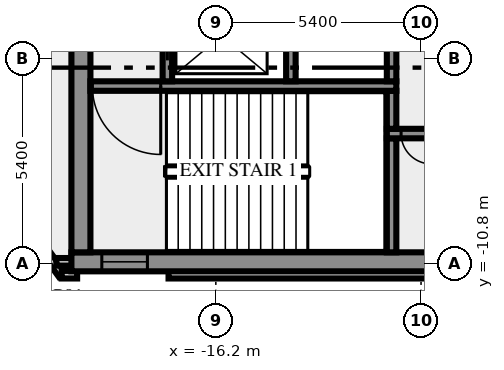
"""IFC4 building model, lengths in metres.
Left out: names, types, materials, properties, quantities, classifications, styles, units other than length and angle.
Written with IfcOpenShell. Run it as: python <this file> out.ifc"""

import sys

from ifc_helpers import new_model, si_unit, direction, frame, frame_2d, origin, place, context, subcontext, project, spatial, rectangle, extrude, element, fill, save


model = new_model("IFC4")
c1 = context("Model", 3, precision=1e-05, world=origin(), true_north=direction((0.0, 1.0)))
c2 = subcontext(c1, "Body", "Model", "MODEL_VIEW")
j1 = project(units=[si_unit("LENGTHUNIT", "METRE"), si_unit("PLANEANGLEUNIT", "RADIAN")], contexts=[c1])
p1 = place(None, origin())
s1 = spatial("IfcSite", under=j1, at=p1, CompositionType="ELEMENT")
p2 = place(p1, origin())
s2 = spatial("IfcBuilding", under=s1, at=p2, CompositionType="ELEMENT")
p3 = place(p2, frame((0.0, 0.0, 261.0)))
s3 = spatial("IfcBuildingStorey", under=s2, at=p3, CompositionType="ELEMENT", Elevation=261.0)
p4 = place(p3, frame((-21.833, -8.909, 0.0), z_axis=(0.0, 0.0, 1.0), x_axis=(0.587766567315, -0.809030569476, 0.0)))
e1 = element("IfcWall", 1, at=p4, inside=s3, PredefinedType="SOLIDWALL", context=c2, shape_type="SweptSolid", body=[
    extrude(rectangle(XDim=2.688, YDim=0.2, at=frame_2d((1.344, 0.0))), origin(), (0.0, 0.0, 1.0), 3.65),
])
p5 = place(p3, frame((-20.256, -11.088, 0.0), z_axis=(0.0, 0.0, 1.0), x_axis=(1.0, 0.0, 0.0)))
e2 = element("IfcWall", 2, at=p5, inside=s3, PredefinedType="SOLIDWALL", context=c2, shape_type="SweptSolid", body=[
    extrude(rectangle(XDim=0.406, YDim=0.2, at=frame_2d((0.203, 0.0))), origin(), (0.0, 0.0, 1.0), 3.65),
])
p6 = place(p3, frame((-17.444, -11.088, 0.0), z_axis=(0.0, 0.0, 1.0), x_axis=(1.0, 0.0, 0.0)))
e3 = element("IfcWall", 3, at=p6, inside=s3, PredefinedType="SOLIDWALL", context=c2, shape_type="SweptSolid", body=[
    extrude(rectangle(XDim=34.888, YDim=0.2, at=frame_2d((17.444, 0.0))), origin(), (0.0, 0.0, 1.0), 3.65),
])
p7 = place(p3, frame((-19.98, -10.75, 0.0), z_axis=(0.0, 0.0, 1.0), x_axis=(-1.0, 0.0, 0.0)))
e4 = element("IfcWall", 4, at=p7, inside=s3, PredefinedType="SOLIDWALL", context=c2, shape_type="SweptSolid", body=[
    extrude(rectangle(XDim=0.417, YDim=0.2, at=frame_2d((0.208, 0.0))), origin(), (0.0, 0.0, 1.0), 3.65),
])
p8 = place(p3, frame((-20.0, -10.75, 0.0), z_axis=(0.0, 0.0, 1.0), x_axis=(1.0, 0.0, 0.0)))
e5 = element("IfcWall", 5, at=p8, inside=s3, PredefinedType="SHEAR", context=c2, shape_type="SweptSolid", body=[
    extrude(rectangle(XDim=40.0, YDim=0.5, at=frame_2d((20.0, 0.0))), origin(), (0.0, 0.0, 1.0), 3.65),
])
p9 = place(p8, frame((0.8, 0.0, 1.0)))
e6 = element("IfcOpeningElement", 6, at=p9, cuts=e5, PredefinedType="OPENING", context=c2, shape_type="SweptSolid", body=[
    extrude(rectangle(XDim=1.2, YDim=1.2, at=frame_2d((0.6, 0.6))), frame((0.0, 0.26, 0.0), z_axis=(0.0, -1.0, 0.0), x_axis=(1.0, 0.0, 0.0)), (0.0, 0.0, 1.0), 0.52),
])
p10 = place(p8, frame((38.0, 0.0, 1.0)))
e7 = element("IfcOpeningElement", 7, at=p10, cuts=e5, PredefinedType="OPENING", context=c2, shape_type="SweptSolid", body=[
    extrude(rectangle(XDim=1.2, YDim=1.2, at=frame_2d((0.6, 0.6))), frame((0.0, 0.26, 0.0), z_axis=(0.0, -1.0, 0.0), x_axis=(1.0, 0.0, 0.0)), (0.0, 0.0, 1.0), 0.52),
])
p11 = place(p3, frame((-19.75, -10.5, 0.0), z_axis=(0.0, 0.0, 1.0), x_axis=(0.0, 1.0, 0.0)))
e8 = element("IfcWall", 8, at=p11, inside=s3, PredefinedType="SHEAR", context=c2, shape_type="SweptSolid", body=[
    extrude(rectangle(XDim=8.8, YDim=0.5, at=frame_2d((4.4, 0.0))), origin(), (0.0, 0.0, 1.0), 3.65),
])
p12 = place(p3, frame((-11.575, -10.5, 0.0), z_axis=(0.0, 0.0, 1.0), x_axis=(0.0, 1.0, 0.0)))
e9 = element("IfcWall", 9, at=p12, inside=s3, PredefinedType="SHEAR", context=c2, shape_type="SweptSolid", body=[
    extrude(rectangle(XDim=3.0, YDim=0.25, at=frame_2d((1.5, 0.0))), origin(), (0.0, 0.0, 1.0), 3.65),
])
p13 = place(p3, frame((11.7, -7.375, 0.0), z_axis=(0.0, 0.0, 1.0), x_axis=(-1.0, 0.0, 0.0)))
e10 = element("IfcWall", 10, at=p13, inside=s3, PredefinedType="SHEAR", context=c2, shape_type="SweptSolid", body=[
    extrude(rectangle(XDim=23.4, YDim=0.25, at=frame_2d((11.7, 0.0))), origin(), (0.0, 0.0, 1.0), 3.65),
])
p14 = place(p13, frame((22.225, 0.0, 0.0)))
e11 = element("IfcOpeningElement", 11, at=p14, cuts=e10, PredefinedType="OPENING", context=c2, shape_type="SweptSolid", body=[
    extrude(rectangle(XDim=0.8, YDim=2.1, at=frame_2d((0.4, 1.05))), frame((0.0, 0.135, 0.0), z_axis=(0.0, -1.0, 0.0), x_axis=(1.0, 0.0, 0.0)), (0.0, 0.0, 1.0), 0.27),
])
p15 = place(p13, frame((20.2, 0.0, 0.0)))
e12 = element("IfcOpeningElement", 12, at=p15, cuts=e10, PredefinedType="OPENING", context=c2, shape_type="SweptSolid", body=[
    extrude(rectangle(XDim=1.1, YDim=2.1, at=frame_2d((0.55, 1.05))), frame((0.0, 0.135, 0.0), z_axis=(0.0, -1.0, 0.0), x_axis=(1.0, 0.0, 0.0)), (0.0, 0.0, 1.0), 0.27),
])
p16 = place(p13, frame((17.7, 0.0, 0.0)))
e13 = element("IfcOpeningElement", 13, at=p16, cuts=e10, PredefinedType="OPENING", context=c2, shape_type="SweptSolid", body=[
    extrude(rectangle(XDim=1.1, YDim=2.1, at=frame_2d((0.55, 1.05))), frame((0.0, 0.135, 0.0), z_axis=(0.0, -1.0, 0.0), x_axis=(1.0, 0.0, 0.0)), (0.0, 0.0, 1.0), 0.27),
])
p17 = place(p13, frame((15.975, 0.0, 0.0)))
e14 = element("IfcOpeningElement", 14, at=p17, cuts=e10, PredefinedType="OPENING", context=c2, shape_type="SweptSolid", body=[
    extrude(rectangle(XDim=0.8, YDim=2.1, at=frame_2d((0.4, 1.05))), frame((0.0, 0.135, 0.0), z_axis=(0.0, -1.0, 0.0), x_axis=(1.0, 0.0, 0.0)), (0.0, 0.0, 1.0), 0.27),
])
p18 = place(p13, frame((14.75, 0.0, 0.0)))
e15 = element("IfcOpeningElement", 15, at=p18, cuts=e10, PredefinedType="OPENING", context=c2, shape_type="SweptSolid", body=[
    extrude(rectangle(XDim=0.7, YDim=2.1, at=frame_2d((0.35, 1.05))), frame((0.0, 0.135, 0.0), z_axis=(0.0, -1.0, 0.0), x_axis=(1.0, 0.0, 0.0)), (0.0, 0.0, 1.0), 0.27),
])
p19 = place(p13, frame((13.35, 0.0, 0.0)))
e16 = element("IfcOpeningElement", 16, at=p19, cuts=e10, PredefinedType="OPENING", context=c2, shape_type="SweptSolid", body=[
    extrude(rectangle(XDim=0.9, YDim=2.1, at=frame_2d((0.45, 1.05))), frame((0.0, 0.135, 0.0), z_axis=(0.0, -1.0, 0.0), x_axis=(1.0, 0.0, 0.0)), (0.0, 0.0, 1.0), 0.27),
])
p20 = place(p13, frame((11.975, 0.0, 0.0)))
e17 = element("IfcOpeningElement", 17, at=p20, cuts=e10, PredefinedType="OPENING", context=c2, shape_type="SweptSolid", body=[
    extrude(rectangle(XDim=0.9, YDim=2.1, at=frame_2d((0.45, 1.05))), frame((0.0, 0.135, 0.0), z_axis=(0.0, -1.0, 0.0), x_axis=(1.0, 0.0, 0.0)), (0.0, 0.0, 1.0), 0.27),
])
p21 = place(p13, frame((10.5, 0.0, 0.0)))
e18 = element("IfcOpeningElement", 18, at=p21, cuts=e10, PredefinedType="OPENING", context=c2, shape_type="SweptSolid", body=[
    extrude(rectangle(XDim=0.9, YDim=2.1, at=frame_2d((0.45, 1.05))), frame((0.0, 0.135, 0.0), z_axis=(0.0, -1.0, 0.0), x_axis=(1.0, 0.0, 0.0)), (0.0, 0.0, 1.0), 0.27),
])
p22 = place(p13, frame((8.388, 0.0, 0.0)))
e19 = element("IfcOpeningElement", 19, at=p22, cuts=e10, PredefinedType="OPENING", context=c2, shape_type="SweptSolid", body=[
    extrude(rectangle(XDim=0.9, YDim=2.1, at=frame_2d((0.45, 1.05))), frame((0.0, 0.135, 0.0), z_axis=(0.0, -1.0, 0.0), x_axis=(1.0, 0.0, 0.0)), (0.0, 0.0, 1.0), 0.27),
])
p23 = place(p13, frame((5.375, 0.0, 0.0)))
e20 = element("IfcOpeningElement", 20, at=p23, cuts=e10, PredefinedType="OPENING", context=c2, shape_type="SweptSolid", body=[
    extrude(rectangle(XDim=0.9, YDim=2.1, at=frame_2d((0.45, 1.05))), frame((0.0, 0.135, 0.0), z_axis=(0.0, -1.0, 0.0), x_axis=(1.0, 0.0, 0.0)), (0.0, 0.0, 1.0), 0.27),
])
p24 = place(p13, frame((1.688, 0.0, 0.0)))
e21 = element("IfcOpeningElement", 21, at=p24, cuts=e10, PredefinedType="OPENING", context=c2, shape_type="SweptSolid", body=[
    extrude(rectangle(XDim=0.9, YDim=2.1, at=frame_2d((0.45, 1.05))), frame((0.0, 0.135, 0.0), z_axis=(0.0, -1.0, 0.0), x_axis=(1.0, 0.0, 0.0)), (0.0, 0.0, 1.0), 0.27),
])
p25 = place(p3, frame((-11.575, -7.25, 0.0), z_axis=(0.0, 0.0, 1.0), x_axis=(0.0, 1.0, 0.0)))
e22 = element("IfcWall", 22, at=p25, inside=s3, PredefinedType="SHEAR", context=c2, shape_type="SweptSolid", body=[
    extrude(rectangle(XDim=1.0, YDim=0.25, at=frame_2d((0.5, 0.0))), origin(), (0.0, 0.0, 1.0), 3.65),
])
p26 = place(p3, frame((-11.45, -6.125, 0.0), z_axis=(0.0, 0.0, 1.0), x_axis=(-1.0, 0.0, 0.0)))
e23 = element("IfcWall", 23, at=p26, inside=s3, PredefinedType="SHEAR", context=c2, shape_type="SweptSolid", body=[
    extrude(rectangle(XDim=8.05, YDim=0.25, at=frame_2d((4.025, 0.0))), origin(), (0.0, 0.0, 1.0), 3.65),
])
p27 = place(p26, frame((6.2, 0.0, 0.0)))
e24 = element("IfcOpeningElement", 24, at=p27, cuts=e23, PredefinedType="OPENING", context=c2, shape_type="SweptSolid", body=[
    extrude(rectangle(XDim=1.8, YDim=2.1, at=frame_2d((0.9, 1.05))), frame((0.0, 0.135, 0.0), z_axis=(0.0, -1.0, 0.0), x_axis=(1.0, 0.0, 0.0)), (0.0, 0.0, 1.0), 0.27),
])
p28 = place(p3, frame((-17.475, -6.0, 0.0), z_axis=(0.0, 0.0, 1.0), x_axis=(0.0, 1.0, 0.0)))
e25 = element("IfcWall", 25, at=p28, inside=s3, PredefinedType="SHEAR", context=c2, shape_type="SweptSolid", body=[
    extrude(rectangle(XDim=4.3, YDim=0.25, at=frame_2d((2.15, 0.0))), origin(), (0.0, 0.0, 1.0), 3.65),
])
p29 = place(p28, frame((0.55, 0.0, 0.0)))
e26 = element("IfcOpeningElement", 26, at=p29, cuts=e25, PredefinedType="OPENING", context=c2, shape_type="SweptSolid", body=[
    extrude(rectangle(XDim=1.3, YDim=2.1, at=frame_2d((0.65, 1.05))), frame((0.0, 0.135, 0.0), z_axis=(0.0, -1.0, 0.0), x_axis=(1.0, 0.0, 0.0)), (0.0, 0.0, 1.0), 0.27),
])
for number, where, z_axis, x_axis in (
    (27, (-14.225, -6.0, 0.0), (0.0, 0.0, 1.0), (0.0, 1.0, 0.0)),
    (28, (-11.575, -6.0, 0.0), (0.0, 0.0, 1.0), (0.0, 1.0, 0.0)),
):
    element("IfcWall", number, at=place(p3, frame(where, z_axis=z_axis, x_axis=x_axis)), inside=s3, PredefinedType="SHEAR", context=c2, shape_type="SweptSolid", body=[
        extrude(rectangle(XDim=1.75, YDim=0.25, at=frame_2d((0.875, 0.0))), origin(), (0.0, 0.0, 1.0), 3.65),
    ])
p30 = place(p9, origin())
e29 = element("IfcWindow", 29, at=p30, inside=s3, PartitioningType="SINGLE_PANEL", PredefinedType="WINDOW", context=c2, shape_type="SweptSolid", body=[
    extrude(rectangle(XDim=1.2, YDim=1.2, at=frame_2d((0.6, 0.6))), frame((0.0, 0.03, 0.0), z_axis=(0.0, -1.0, 0.0), x_axis=(1.0, 0.0, 0.0)), (0.0, 0.0, 1.0), 0.06),
])
fill(e6, e29)
p31 = place(p14, origin())
e30 = element("IfcDoor", 30, at=p31, inside=s3, OperationType="SINGLE_SWING_RIGHT", PredefinedType="DOOR", context=c2, shape_type="SweptSolid", body=[
    extrude(rectangle(XDim=0.8, YDim=2.1, at=frame_2d((0.4, 1.05))), frame((0.0, 0.025, 0.0), z_axis=(0.0, -1.0, 0.0), x_axis=(1.0, 0.0, 0.0)), (0.0, 0.0, 1.0), 0.05),
])
fill(e11, e30)
p32 = place(p27, origin())
e31 = element("IfcDoor", 31, at=p32, inside=s3, OperationType="DOUBLE_DOOR_SINGLE_SWING", PredefinedType="DOOR", context=c2, shape_type="SweptSolid", body=[
    extrude(rectangle(XDim=1.8, YDim=2.1, at=frame_2d((0.9, 1.05))), frame((0.0, 0.025, 0.0), z_axis=(0.0, -1.0, 0.0), x_axis=(1.0, 0.0, 0.0)), (0.0, 0.0, 1.0), 0.05),
])
fill(e24, e31)
p33 = place(p29, origin())
e32 = element("IfcDoor", 32, at=p33, inside=s3, OperationType="DOUBLE_DOOR_SLIDING", PredefinedType="DOOR", context=c2, shape_type="SweptSolid", body=[
    extrude(rectangle(XDim=1.3, YDim=2.1, at=frame_2d((0.65, 1.05))), frame((0.0, 0.025, 0.0), z_axis=(0.0, -1.0, 0.0), x_axis=(1.0, 0.0, 0.0)), (0.0, 0.0, 1.0), 0.05),
])
fill(e26, e32)
save(model, sys.argv[1])
